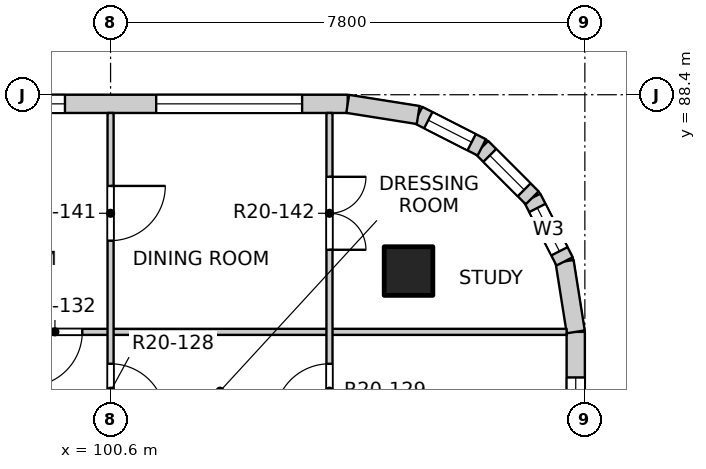
"""IFC4 building model, lengths in metres.
Left out: names, types, materials, properties, quantities, classifications, styles, units other than length and angle.
Written with IfcOpenShell. Run it as: python <this file> out.ifc"""

import sys

from ifc_helpers import new_model, si_unit, direction, frame, frame_2d, origin, origin_2d, place, context, subcontext, project, spatial, rectangle, extrude, element, fill, save


model = new_model("IFC4")
c1 = context("Model", 3, precision=1e-05, world=origin(), true_north=direction((0.0, 1.0)))
c2 = subcontext(c1, "Body", "Model", "MODEL_VIEW")
j1 = project(units=[si_unit("LENGTHUNIT", "METRE"), si_unit("PLANEANGLEUNIT", "RADIAN")], contexts=[c1])
p1 = place(None, origin())
s1 = spatial("IfcSite", under=j1, at=p1, CompositionType="ELEMENT")
p2 = place(p1, origin())
s2 = spatial("IfcBuilding", under=s1, at=p2, CompositionType="ELEMENT")
p3 = place(p2, frame((0.0, 0.0, 204.1)))
s3 = spatial("IfcBuildingStorey", under=s2, at=p3, CompositionType="ELEMENT", Elevation=204.1)
p4 = place(p3, frame((105.5, 85.5, -0.25), z_axis=(0.0, 0.0, 1.0), x_axis=(1.0, 0.0, 0.0)))
e1 = element("IfcColumn", 1, at=p4, inside=s3, PredefinedType="COLUMN", context=c2, shape_type="SweptSolid", body=[
    extrude(rectangle(XDim=0.8, YDim=0.8, at=origin_2d()), origin(), (0.0, 0.0, 1.0), 3.4),
])
p5 = place(p3, frame((108.25, 77.1, 0.0), z_axis=(0.0, 0.0, 1.0), x_axis=(0.0, 1.0, 0.0)))
e2 = element("IfcWall", 2, at=p5, inside=s3, PredefinedType="SOLIDWALL", context=c2, shape_type="SweptSolid", body=[
    extrude(rectangle(XDim=7.4, YDim=0.3, at=frame_2d((3.7, 0.0))), origin(), (0.0, 0.0, 1.0), 2.7),
])
p6 = place(p5, frame((0.35, 0.0, 0.9)))
e3 = element("IfcOpeningElement", 3, at=p6, cuts=e2, PredefinedType="OPENING", context=c2, shape_type="SweptSolid", body=[
    extrude(rectangle(XDim=2.4, YDim=1.8, at=frame_2d((1.2, 0.9))), frame((0.0, 0.16, 0.0), z_axis=(0.0, -1.0, 0.0), x_axis=(1.0, 0.0, 0.0)), (0.0, 0.0, 1.0), 0.32),
])
p7 = place(p5, frame((4.25, 0.0, 0.9)))
e4 = element("IfcOpeningElement", 4, at=p7, cuts=e2, PredefinedType="OPENING", context=c2, shape_type="SweptSolid", body=[
    extrude(rectangle(XDim=2.4, YDim=1.8, at=frame_2d((1.2, 0.9))), frame((0.0, 0.16, 0.0), z_axis=(0.0, -1.0, 0.0), x_axis=(1.0, 0.0, 0.0)), (0.0, 0.0, 1.0), 0.32),
])
p8 = place(p3, frame((97.1, 88.25, 0.0), z_axis=(0.0, 0.0, 1.0), x_axis=(1.0, 0.0, 0.0)))
e5 = element("IfcWall", 5, at=p8, inside=s3, PredefinedType="SOLIDWALL", context=c2, shape_type="SweptSolid", body=[
    extrude(rectangle(XDim=7.4, YDim=0.3, at=frame_2d((3.7, 0.0))), origin(), (0.0, 0.0, 1.0), 2.7),
])
p9 = place(p8, frame((0.35, 0.0, 0.9)))
e6 = element("IfcOpeningElement", 6, at=p9, cuts=e5, PredefinedType="OPENING", context=c2, shape_type="SweptSolid", body=[
    extrude(rectangle(XDim=2.4, YDim=1.8, at=frame_2d((1.2, 0.9))), frame((0.0, 0.16, 0.0), z_axis=(0.0, -1.0, 0.0), x_axis=(1.0, 0.0, 0.0)), (0.0, 0.0, 1.0), 0.32),
])
p10 = place(p8, frame((4.25, 0.0, 0.9)))
e7 = element("IfcOpeningElement", 7, at=p10, cuts=e5, PredefinedType="OPENING", context=c2, shape_type="SweptSolid", body=[
    extrude(rectangle(XDim=2.4, YDim=1.8, at=frame_2d((1.2, 0.9))), frame((0.0, 0.16, 0.0), z_axis=(0.0, -1.0, 0.0), x_axis=(1.0, 0.0, 0.0)), (0.0, 0.0, 1.0), 0.32),
])
p11 = place(p3, frame((108.25, 84.5, 0.0), z_axis=(0.0, 0.0, 1.0), x_axis=(-0.156496880861, 0.987678452879, 0.0)))
e8 = element("IfcWall", 8, at=p11, inside=s3, PredefinedType="SOLIDWALL", context=c2, shape_type="SweptSolid", body=[
    extrude(rectangle(XDim=1.173, YDim=0.3, at=frame_2d((0.586, 0.0))), origin(), (0.0, 0.0, 1.0), 2.7),
])
p12 = place(p3, frame((108.066, 85.659, 0.0), z_axis=(0.0, 0.0, 1.0), x_axis=(-0.454025524128, 0.890988677504, 0.0)))
e9 = element("IfcWall", 9, at=p12, inside=s3, PredefinedType="SOLIDWALL", context=c2, shape_type="SweptSolid", body=[
    extrude(rectangle(XDim=1.173, YDim=0.3, at=frame_2d((0.587, 0.0))), origin(), (0.0, 0.0, 1.0), 2.7),
])
p13 = place(p12, frame((0.187, 0.0, 0.9)))
e10 = element("IfcOpeningElement", 10, at=p13, cuts=e9, PredefinedType="OPENING", context=c2, shape_type="SweptSolid", body=[
    extrude(rectangle(XDim=0.8, YDim=1.2, at=frame_2d((0.4, 0.6))), frame((0.0, 0.16, 0.0), z_axis=(0.0, -1.0, 0.0), x_axis=(1.0, 0.0, 0.0)), (0.0, 0.0, 1.0), 0.32),
])
p14 = place(p3, frame((107.534, 86.704, 0.0), z_axis=(0.0, 0.0, 1.0), x_axis=(-0.707106781187, 0.707106781187, 0.0)))
e11 = element("IfcWall", 11, at=p14, inside=s3, PredefinedType="SOLIDWALL", context=c2, shape_type="SweptSolid", body=[
    extrude(rectangle(XDim=1.173, YDim=0.3, at=frame_2d((0.586, 0.0))), origin(), (0.0, 0.0, 1.0), 2.7),
])
p15 = place(p14, frame((0.187, 0.0, 0.9)))
e12 = element("IfcOpeningElement", 12, at=p15, cuts=e11, PredefinedType="OPENING", context=c2, shape_type="SweptSolid", body=[
    extrude(rectangle(XDim=0.8, YDim=1.2, at=frame_2d((0.4, 0.6))), frame((0.0, 0.16, 0.0), z_axis=(0.0, -1.0, 0.0), x_axis=(1.0, 0.0, 0.0)), (0.0, 0.0, 1.0), 0.32),
])
p16 = place(p3, frame((106.704, 87.534, 0.0), z_axis=(0.0, 0.0, 1.0), x_axis=(-0.890988677504, 0.454025524128, 0.0)))
e13 = element("IfcWall", 13, at=p16, inside=s3, PredefinedType="SOLIDWALL", context=c2, shape_type="SweptSolid", body=[
    extrude(rectangle(XDim=1.173, YDim=0.3, at=frame_2d((0.587, 0.0))), origin(), (0.0, 0.0, 1.0), 2.7),
])
p17 = place(p16, frame((0.187, 0.0, 0.9)))
e14 = element("IfcOpeningElement", 14, at=p17, cuts=e13, PredefinedType="OPENING", context=c2, shape_type="SweptSolid", body=[
    extrude(rectangle(XDim=0.8, YDim=1.2, at=frame_2d((0.4, 0.6))), frame((0.0, 0.16, 0.0), z_axis=(0.0, -1.0, 0.0), x_axis=(1.0, 0.0, 0.0)), (0.0, 0.0, 1.0), 0.32),
])
p18 = place(p3, frame((105.659, 88.066, 0.0), z_axis=(0.0, 0.0, 1.0), x_axis=(-0.987678452879, 0.156496880861, 0.0)))
e15 = element("IfcWall", 15, at=p18, inside=s3, PredefinedType="SOLIDWALL", context=c2, shape_type="SweptSolid", body=[
    extrude(rectangle(XDim=1.173, YDim=0.3, at=frame_2d((0.586, 0.0))), origin(), (0.0, 0.0, 1.0), 2.7),
])
p19 = place(p3, frame((96.6, 84.5, 0.0), z_axis=(0.0, 0.0, 1.0), x_axis=(1.0, 0.0, 0.0)))
e16 = element("IfcWall", 16, at=p19, inside=s3, PredefinedType="PARTITIONING", context=c2, shape_type="SweptSolid", body=[
    extrude(rectangle(XDim=11.5, YDim=0.1, at=frame_2d((5.75, 0.0))), origin(), (0.0, 0.0, 1.0), 3.15),
])
p20 = place(p19, frame((2.635, 0.0, 0.0)))
e17 = element("IfcOpeningElement", 17, at=p20, cuts=e16, PredefinedType="OPENING", context=c2, shape_type="SweptSolid", body=[
    extrude(rectangle(XDim=0.9, YDim=2.1, at=frame_2d((0.45, 1.05))), frame((0.0, 0.06, 0.0), z_axis=(0.0, -1.0, 0.0), x_axis=(1.0, 0.0, 0.0)), (0.0, 0.0, 1.0), 0.12),
])
p21 = place(p3, frame((100.6, 41.9, 0.0), z_axis=(0.0, 0.0, 1.0), x_axis=(0.0, 1.0, 0.0)))
e18 = element("IfcWall", 18, at=p21, inside=s3, PredefinedType="PARTITIONING", context=c2, shape_type="SweptSolid", body=[
    extrude(rectangle(XDim=46.2, YDim=0.1, at=frame_2d((23.1, 0.0))), origin(), (0.0, 0.0, 1.0), 3.15),
])
p22 = place(p21, frame((1.2, 0.0, 0.0)))
e19 = element("IfcOpeningElement", 19, at=p22, cuts=e18, PredefinedType="OPENING", context=c2, shape_type="SweptSolid", body=[
    extrude(rectangle(XDim=0.9, YDim=2.1, at=frame_2d((0.45, 1.05))), frame((0.0, 0.06, 0.0), z_axis=(0.0, -1.0, 0.0), x_axis=(1.0, 0.0, 0.0)), (0.0, 0.0, 1.0), 0.12),
])
p23 = place(p21, frame((6.025, 0.0, 0.0)))
e20 = element("IfcOpeningElement", 20, at=p23, cuts=e18, PredefinedType="OPENING", context=c2, shape_type="SweptSolid", body=[
    extrude(rectangle(XDim=0.9, YDim=2.1, at=frame_2d((0.45, 1.05))), frame((0.0, 0.06, 0.0), z_axis=(0.0, -1.0, 0.0), x_axis=(1.0, 0.0, 0.0)), (0.0, 0.0, 1.0), 0.12),
])
p24 = place(p21, frame((9.0, 0.0, 0.0)))
e21 = element("IfcOpeningElement", 21, at=p24, cuts=e18, PredefinedType="OPENING", context=c2, shape_type="SweptSolid", body=[
    extrude(rectangle(XDim=0.9, YDim=2.1, at=frame_2d((0.45, 1.05))), frame((0.0, 0.06, 0.0), z_axis=(0.0, -1.0, 0.0), x_axis=(1.0, 0.0, 0.0)), (0.0, 0.0, 1.0), 0.12),
])
p25 = place(p21, frame((13.85, 0.0, 0.0)))
e22 = element("IfcOpeningElement", 22, at=p25, cuts=e18, PredefinedType="OPENING", context=c2, shape_type="SweptSolid", body=[
    extrude(rectangle(XDim=0.9, YDim=2.1, at=frame_2d((0.45, 1.05))), frame((0.0, 0.06, 0.0), z_axis=(0.0, -1.0, 0.0), x_axis=(1.0, 0.0, 0.0)), (0.0, 0.0, 1.0), 0.12),
])
p26 = place(p21, frame((17.775, 0.0, 0.0)))
e23 = element("IfcOpeningElement", 23, at=p26, cuts=e18, PredefinedType="OPENING", context=c2, shape_type="SweptSolid", body=[
    extrude(rectangle(XDim=0.9, YDim=2.1, at=frame_2d((0.45, 1.05))), frame((0.0, 0.06, 0.0), z_axis=(0.0, -1.0, 0.0), x_axis=(1.0, 0.0, 0.0)), (0.0, 0.0, 1.0), 0.12),
])
p27 = place(p21, frame((20.7, 0.0, 0.0)))
e24 = element("IfcOpeningElement", 24, at=p27, cuts=e18, PredefinedType="OPENING", context=c2, shape_type="SweptSolid", body=[
    extrude(rectangle(XDim=0.9, YDim=2.1, at=frame_2d((0.45, 1.05))), frame((0.0, 0.06, 0.0), z_axis=(0.0, -1.0, 0.0), x_axis=(1.0, 0.0, 0.0)), (0.0, 0.0, 1.0), 0.12),
])
p28 = place(p21, frame((24.6, 0.0, 0.0)))
e25 = element("IfcOpeningElement", 25, at=p28, cuts=e18, PredefinedType="OPENING", context=c2, shape_type="SweptSolid", body=[
    extrude(rectangle(XDim=0.9, YDim=2.1, at=frame_2d((0.45, 1.05))), frame((0.0, 0.06, 0.0), z_axis=(0.0, -1.0, 0.0), x_axis=(1.0, 0.0, 0.0)), (0.0, 0.0, 1.0), 0.12),
])
p29 = place(p21, frame((29.425, 0.0, 0.0)))
e26 = element("IfcOpeningElement", 26, at=p29, cuts=e18, PredefinedType="OPENING", context=c2, shape_type="SweptSolid", body=[
    extrude(rectangle(XDim=0.9, YDim=2.1, at=frame_2d((0.45, 1.05))), frame((0.0, 0.06, 0.0), z_axis=(0.0, -1.0, 0.0), x_axis=(1.0, 0.0, 0.0)), (0.0, 0.0, 1.0), 0.12),
])
p30 = place(p21, frame((33.375, 0.0, 0.0)))
e27 = element("IfcOpeningElement", 27, at=p30, cuts=e18, PredefinedType="OPENING", context=c2, shape_type="SweptSolid", body=[
    extrude(rectangle(XDim=0.9, YDim=2.1, at=frame_2d((0.45, 1.05))), frame((0.0, 0.06, 0.0), z_axis=(0.0, -1.0, 0.0), x_axis=(1.0, 0.0, 0.0)), (0.0, 0.0, 1.0), 0.12),
])
p31 = place(p21, frame((36.3, 0.0, 0.0)))
e28 = element("IfcOpeningElement", 28, at=p31, cuts=e18, PredefinedType="OPENING", context=c2, shape_type="SweptSolid", body=[
    extrude(rectangle(XDim=0.9, YDim=2.1, at=frame_2d((0.45, 1.05))), frame((0.0, 0.06, 0.0), z_axis=(0.0, -1.0, 0.0), x_axis=(1.0, 0.0, 0.0)), (0.0, 0.0, 1.0), 0.12),
])
p32 = place(p21, frame((41.175, 0.0, 0.0)))
e29 = element("IfcOpeningElement", 29, at=p32, cuts=e18, PredefinedType="OPENING", context=c2, shape_type="SweptSolid", body=[
    extrude(rectangle(XDim=0.9, YDim=2.1, at=frame_2d((0.45, 1.05))), frame((0.0, 0.06, 0.0), z_axis=(0.0, -1.0, 0.0), x_axis=(1.0, 0.0, 0.0)), (0.0, 0.0, 1.0), 0.12),
])
p33 = place(p21, frame((44.1, 0.0, 0.0)))
e30 = element("IfcOpeningElement", 30, at=p33, cuts=e18, PredefinedType="OPENING", context=c2, shape_type="SweptSolid", body=[
    extrude(rectangle(XDim=0.9, YDim=2.1, at=frame_2d((0.45, 1.05))), frame((0.0, 0.06, 0.0), z_axis=(0.0, -1.0, 0.0), x_axis=(1.0, 0.0, 0.0)), (0.0, 0.0, 1.0), 0.12),
])
p34 = place(p3, frame((104.2, 61.2, 0.0), z_axis=(0.0, 0.0, 1.0), x_axis=(0.0, 1.0, 0.0)))
e31 = element("IfcWall", 31, at=p34, inside=s3, PredefinedType="PARTITIONING", context=c2, shape_type="SweptSolid", body=[
    extrude(rectangle(XDim=26.9, YDim=0.1, at=frame_2d((13.45, 0.0))), origin(), (0.0, 0.0, 1.0), 3.15),
])
p35 = place(p34, frame((1.25, 0.0, 0.0)))
e32 = element("IfcOpeningElement", 32, at=p35, cuts=e31, PredefinedType="OPENING", context=c2, shape_type="SweptSolid", body=[
    extrude(rectangle(XDim=1.2, YDim=2.1, at=frame_2d((0.6, 1.05))), frame((0.0, 0.06, 0.0), z_axis=(0.0, -1.0, 0.0), x_axis=(1.0, 0.0, 0.0)), (0.0, 0.0, 1.0), 0.12),
])
p36 = place(p34, frame((5.15, 0.0, 0.0)))
e33 = element("IfcOpeningElement", 33, at=p36, cuts=e31, PredefinedType="OPENING", context=c2, shape_type="SweptSolid", body=[
    extrude(rectangle(XDim=1.2, YDim=2.1, at=frame_2d((0.6, 1.05))), frame((0.0, 0.06, 0.0), z_axis=(0.0, -1.0, 0.0), x_axis=(1.0, 0.0, 0.0)), (0.0, 0.0, 1.0), 0.12),
])
p37 = place(p34, frame((8.225, 0.0, 0.0)))
e34 = element("IfcOpeningElement", 34, at=p37, cuts=e31, PredefinedType="OPENING", context=c2, shape_type="SweptSolid", body=[
    extrude(rectangle(XDim=0.9, YDim=2.1, at=frame_2d((0.45, 1.05))), frame((0.0, 0.06, 0.0), z_axis=(0.0, -1.0, 0.0), x_axis=(1.0, 0.0, 0.0)), (0.0, 0.0, 1.0), 0.12),
])
p38 = place(p34, frame((10.175, 0.0, 0.0)))
e35 = element("IfcOpeningElement", 35, at=p38, cuts=e31, PredefinedType="OPENING", context=c2, shape_type="SweptSolid", body=[
    extrude(rectangle(XDim=0.9, YDim=2.1, at=frame_2d((0.45, 1.05))), frame((0.0, 0.06, 0.0), z_axis=(0.0, -1.0, 0.0), x_axis=(1.0, 0.0, 0.0)), (0.0, 0.0, 1.0), 0.12),
])
p39 = place(p34, frame((12.125, 0.0, 0.0)))
e36 = element("IfcOpeningElement", 36, at=p39, cuts=e31, PredefinedType="OPENING", context=c2, shape_type="SweptSolid", body=[
    extrude(rectangle(XDim=0.9, YDim=2.1, at=frame_2d((0.45, 1.05))), frame((0.0, 0.06, 0.0), z_axis=(0.0, -1.0, 0.0), x_axis=(1.0, 0.0, 0.0)), (0.0, 0.0, 1.0), 0.12),
])
p40 = place(p34, frame((14.075, 0.0, 0.0)))
e37 = element("IfcOpeningElement", 37, at=p40, cuts=e31, PredefinedType="OPENING", context=c2, shape_type="SweptSolid", body=[
    extrude(rectangle(XDim=0.9, YDim=2.1, at=frame_2d((0.45, 1.05))), frame((0.0, 0.06, 0.0), z_axis=(0.0, -1.0, 0.0), x_axis=(1.0, 0.0, 0.0)), (0.0, 0.0, 1.0), 0.12),
])
p41 = place(p34, frame((16.85, 0.0, 0.0)))
e38 = element("IfcOpeningElement", 38, at=p41, cuts=e31, PredefinedType="OPENING", context=c2, shape_type="SweptSolid", body=[
    extrude(rectangle(XDim=1.2, YDim=2.1, at=frame_2d((0.6, 1.05))), frame((0.0, 0.06, 0.0), z_axis=(0.0, -1.0, 0.0), x_axis=(1.0, 0.0, 0.0)), (0.0, 0.0, 1.0), 0.12),
])
p42 = place(p34, frame((19.925, 0.0, 0.0)))
e39 = element("IfcOpeningElement", 39, at=p42, cuts=e31, PredefinedType="OPENING", context=c2, shape_type="SweptSolid", body=[
    extrude(rectangle(XDim=0.9, YDim=2.1, at=frame_2d((0.45, 1.05))), frame((0.0, 0.06, 0.0), z_axis=(0.0, -1.0, 0.0), x_axis=(1.0, 0.0, 0.0)), (0.0, 0.0, 1.0), 0.12),
])
p43 = place(p34, frame((21.875, 0.0, 0.0)))
e40 = element("IfcOpeningElement", 40, at=p43, cuts=e31, PredefinedType="OPENING", context=c2, shape_type="SweptSolid", body=[
    extrude(rectangle(XDim=0.9, YDim=2.1, at=frame_2d((0.45, 1.05))), frame((0.0, 0.06, 0.0), z_axis=(0.0, -1.0, 0.0), x_axis=(1.0, 0.0, 0.0)), (0.0, 0.0, 1.0), 0.12),
])
p44 = place(p34, frame((24.65, 0.0, 0.0)))
e41 = element("IfcOpeningElement", 41, at=p44, cuts=e31, PredefinedType="OPENING", context=c2, shape_type="SweptSolid", body=[
    extrude(rectangle(XDim=1.2, YDim=2.1, at=frame_2d((0.6, 1.05))), frame((0.0, 0.06, 0.0), z_axis=(0.0, -1.0, 0.0), x_axis=(1.0, 0.0, 0.0)), (0.0, 0.0, 1.0), 0.12),
])
p45 = place(p7, origin())
e42 = element("IfcWindow", 42, at=p45, inside=s3, PartitioningType="DOUBLE_PANEL_VERTICAL", PredefinedType="WINDOW", context=c2, shape_type="SweptSolid", body=[
    extrude(rectangle(XDim=2.4, YDim=1.8, at=frame_2d((1.2, 0.9))), frame((0.0, 0.03, 0.0), z_axis=(0.0, -1.0, 0.0), x_axis=(1.0, 0.0, 0.0)), (0.0, 0.0, 1.0), 0.06),
])
fill(e4, e42)
p46 = place(p9, origin())
e43 = element("IfcWindow", 43, at=p46, inside=s3, PartitioningType="DOUBLE_PANEL_VERTICAL", PredefinedType="WINDOW", context=c2, shape_type="SweptSolid", body=[
    extrude(rectangle(XDim=2.4, YDim=1.8, at=frame_2d((1.2, 0.9))), frame((0.0, 0.03, 0.0), z_axis=(0.0, -1.0, 0.0), x_axis=(1.0, 0.0, 0.0)), (0.0, 0.0, 1.0), 0.06),
])
fill(e6, e43)
p47 = place(p10, origin())
e44 = element("IfcWindow", 44, at=p47, inside=s3, PartitioningType="DOUBLE_PANEL_VERTICAL", PredefinedType="WINDOW", context=c2, shape_type="SweptSolid", body=[
    extrude(rectangle(XDim=2.4, YDim=1.8, at=frame_2d((1.2, 0.9))), frame((0.0, 0.03, 0.0), z_axis=(0.0, -1.0, 0.0), x_axis=(1.0, 0.0, 0.0)), (0.0, 0.0, 1.0), 0.06),
])
fill(e7, e44)
p48 = place(p13, origin())
e45 = element("IfcWindow", 45, at=p48, inside=s3, PartitioningType="SINGLE_PANEL", PredefinedType="WINDOW", context=c2, shape_type="SweptSolid", body=[
    extrude(rectangle(XDim=0.8, YDim=1.2, at=frame_2d((0.4, 0.6))), frame((0.0, 0.03, 0.0), z_axis=(0.0, -1.0, 0.0), x_axis=(1.0, 0.0, 0.0)), (0.0, 0.0, 1.0), 0.06),
])
fill(e10, e45)
p49 = place(p15, origin())
e46 = element("IfcWindow", 46, at=p49, inside=s3, PartitioningType="SINGLE_PANEL", PredefinedType="WINDOW", context=c2, shape_type="SweptSolid", body=[
    extrude(rectangle(XDim=0.8, YDim=1.2, at=frame_2d((0.4, 0.6))), frame((0.0, 0.03, 0.0), z_axis=(0.0, -1.0, 0.0), x_axis=(1.0, 0.0, 0.0)), (0.0, 0.0, 1.0), 0.06),
])
fill(e12, e46)
p50 = place(p17, origin())
e47 = element("IfcWindow", 47, at=p50, inside=s3, PartitioningType="SINGLE_PANEL", PredefinedType="WINDOW", context=c2, shape_type="SweptSolid", body=[
    extrude(rectangle(XDim=0.8, YDim=1.2, at=frame_2d((0.4, 0.6))), frame((0.0, 0.03, 0.0), z_axis=(0.0, -1.0, 0.0), x_axis=(1.0, 0.0, 0.0)), (0.0, 0.0, 1.0), 0.06),
])
fill(e14, e47)
p51 = place(p32, origin())
e48 = element("IfcDoor", 48, at=p51, inside=s3, OperationType="SINGLE_SWING_RIGHT", PredefinedType="DOOR", context=c2, shape_type="SweptSolid", body=[
    extrude(rectangle(XDim=0.9, YDim=2.1, at=frame_2d((0.45, 1.05))), frame((0.0, 0.025, 0.0), z_axis=(0.0, -1.0, 0.0), x_axis=(1.0, 0.0, 0.0)), (0.0, 0.0, 1.0), 0.05),
])
fill(e29, e48)
p52 = place(p43, origin())
e49 = element("IfcDoor", 49, at=p52, inside=s3, OperationType="SINGLE_SWING_LEFT", PredefinedType="DOOR", context=c2, shape_type="SweptSolid", body=[
    extrude(rectangle(XDim=0.9, YDim=2.1, at=frame_2d((0.45, 1.05))), frame((0.0, 0.025, 0.0), z_axis=(0.0, -1.0, 0.0), x_axis=(1.0, 0.0, 0.0)), (0.0, 0.0, 1.0), 0.05),
])
fill(e40, e49)
p53 = place(p20, origin())
e50 = element("IfcDoor", 50, at=p53, inside=s3, OperationType="SINGLE_SWING_RIGHT", PredefinedType="DOOR", context=c2, shape_type="SweptSolid", body=[
    extrude(rectangle(XDim=0.9, YDim=2.1, at=frame_2d((0.45, 1.05))), frame((0.0, 0.025, 0.0), z_axis=(0.0, -1.0, 0.0), x_axis=(1.0, 0.0, 0.0)), (0.0, 0.0, 1.0), 0.05),
])
fill(e17, e50)
p54 = place(p33, origin())
e51 = element("IfcDoor", 51, at=p54, inside=s3, OperationType="SINGLE_SWING_LEFT", PredefinedType="DOOR", context=c2, shape_type="SweptSolid", body=[
    extrude(rectangle(XDim=0.9, YDim=2.1, at=frame_2d((0.45, 1.05))), frame((0.0, 0.025, 0.0), z_axis=(0.0, -1.0, 0.0), x_axis=(1.0, 0.0, 0.0)), (0.0, 0.0, 1.0), 0.05),
])
fill(e30, e51)
p55 = place(p44, origin())
e52 = element("IfcDoor", 52, at=p55, inside=s3, OperationType="DOUBLE_DOOR_SINGLE_SWING", PredefinedType="DOOR", context=c2, shape_type="SweptSolid", body=[
    extrude(rectangle(XDim=1.2, YDim=2.1, at=frame_2d((0.6, 1.05))), frame((0.0, 0.025, 0.0), z_axis=(0.0, -1.0, 0.0), x_axis=(1.0, 0.0, 0.0)), (0.0, 0.0, 1.0), 0.05),
])
fill(e41, e52)
save(model, sys.argv[1])
